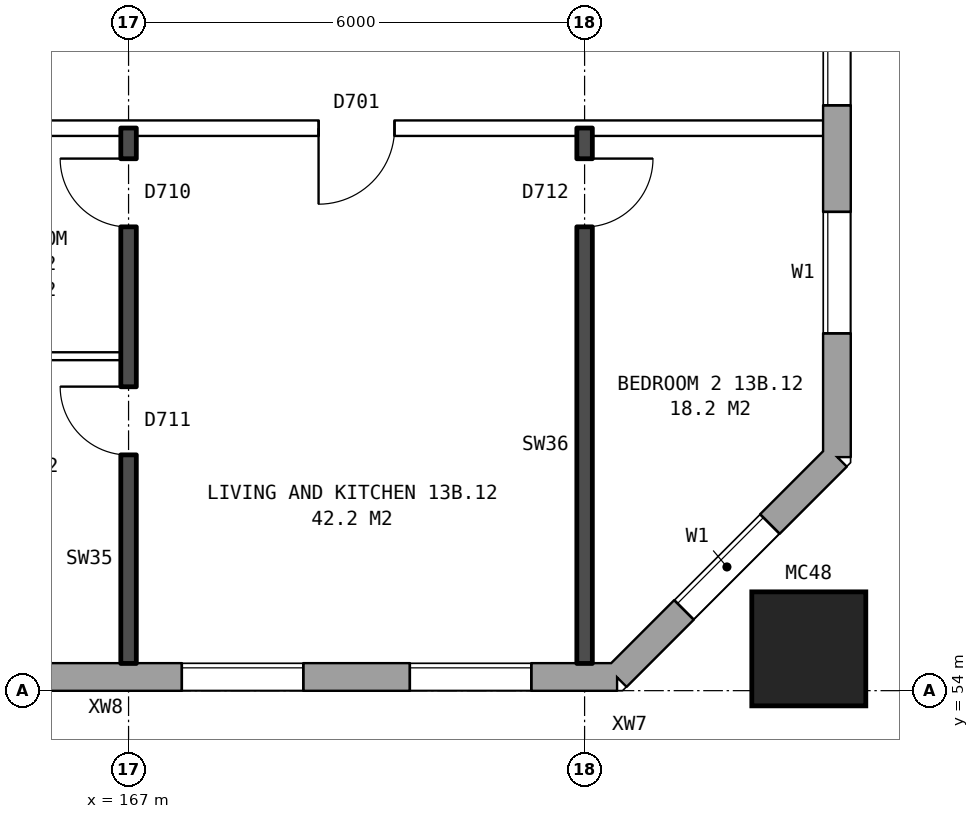
"""IFC4 building model, lengths in metres.
Left out: names, types, materials, properties, quantities, classifications, styles, units other than length and angle.
Written with IfcOpenShell. Run it as: python <this file> out.ifc"""

import sys

from ifc_helpers import new_model, si_unit, direction, frame, frame_2d, origin, origin_2d, place, context, subcontext, project, spatial, rectangle, hollow_rectangle, extrude, element, fill, save


model = new_model("IFC4")
c1 = context("Model", 3, precision=1e-05, world=origin(), true_north=direction((0.0, 1.0)))
c2 = subcontext(c1, "Body", "Model", "MODEL_VIEW")
j1 = project(units=[si_unit("LENGTHUNIT", "METRE"), si_unit("PLANEANGLEUNIT", "RADIAN")], contexts=[c1])
p1 = place(None, origin())
s1 = spatial("IfcSite", under=j1, at=p1, CompositionType="ELEMENT")
p2 = place(p1, origin())
s2 = spatial("IfcBuilding", under=s1, at=p2, CompositionType="ELEMENT")
p3 = place(p2, frame((0.0, 0.0, 50.5)))
s3 = spatial("IfcBuildingStorey", under=s2, at=p3, CompositionType="ELEMENT", Elevation=50.5)
p4 = place(p3, frame((175.95, 54.55, 0.0), z_axis=(0.0, 0.0, 1.0), x_axis=(1.0, 0.0, 0.0)))
e1 = element("IfcColumn", 1, at=p4, inside=s3, PredefinedType="COLUMN", context=c2, shape_type="SweptSolid", body=[
    extrude(hollow_rectangle(XDim=1.5, YDim=1.5, WallThickness=0.08, at=origin_2d()), origin(), (0.0, 0.0, 1.0), 3.1),
])
p5 = place(p3, frame((134.075, 54.18, 0.0), z_axis=(0.0, 0.0, 1.0), x_axis=(1.0, 0.0, 0.0)))
e2 = element("IfcWall", 2, at=p5, inside=s3, PredefinedType="STANDARD", context=c2, shape_type="SweptSolid", body=[
    extrude(rectangle(XDim=39.351, YDim=0.36, at=frame_2d((19.675, 0.0))), origin(), (0.0, 0.0, 1.0), 2.85),
])
p6 = place(p5, frame((0.625, 0.0, 0.8)))
e3 = element("IfcOpeningElement", 3, at=p6, cuts=e2, PredefinedType="OPENING", context=c2, shape_type="SweptSolid", body=[
    extrude(rectangle(XDim=1.6, YDim=1.8, at=frame_2d((0.8, 0.9))), frame((0.0, 0.19, 0.0), z_axis=(0.0, -1.0, 0.0), x_axis=(1.0, 0.0, 0.0)), (0.0, 0.0, 1.0), 0.38),
])
p7 = place(p5, frame((3.625, 0.0, 0.8)))
e4 = element("IfcOpeningElement", 4, at=p7, cuts=e2, PredefinedType="OPENING", context=c2, shape_type="SweptSolid", body=[
    extrude(rectangle(XDim=1.6, YDim=1.8, at=frame_2d((0.8, 0.9))), frame((0.0, 0.19, 0.0), z_axis=(0.0, -1.0, 0.0), x_axis=(1.0, 0.0, 0.0)), (0.0, 0.0, 1.0), 0.38),
])
p8 = place(p5, frame((5.525, 0.0, 1.4)))
e5 = element("IfcOpeningElement", 5, at=p8, cuts=e2, PredefinedType="OPENING", context=c2, shape_type="SweptSolid", body=[
    extrude(rectangle(XDim=0.6, YDim=1.2, at=frame_2d((0.3, 0.6))), frame((0.0, 0.19, 0.0), z_axis=(0.0, -1.0, 0.0), x_axis=(1.0, 0.0, 0.0)), (0.0, 0.0, 1.0), 0.38),
])
p9 = place(p5, frame((9.625, 0.0, 0.8)))
e6 = element("IfcOpeningElement", 6, at=p9, cuts=e2, PredefinedType="OPENING", context=c2, shape_type="SweptSolid", body=[
    extrude(rectangle(XDim=1.6, YDim=1.8, at=frame_2d((0.8, 0.9))), frame((0.0, 0.19, 0.0), z_axis=(0.0, -1.0, 0.0), x_axis=(1.0, 0.0, 0.0)), (0.0, 0.0, 1.0), 0.38),
])
p10 = place(p5, frame((12.625, 0.0, 0.8)))
e7 = element("IfcOpeningElement", 7, at=p10, cuts=e2, PredefinedType="OPENING", context=c2, shape_type="SweptSolid", body=[
    extrude(rectangle(XDim=1.6, YDim=1.8, at=frame_2d((0.8, 0.9))), frame((0.0, 0.19, 0.0), z_axis=(0.0, -1.0, 0.0), x_axis=(1.0, 0.0, 0.0)), (0.0, 0.0, 1.0), 0.38),
])
p11 = place(p5, frame((15.625, 0.0, 0.8)))
e8 = element("IfcOpeningElement", 8, at=p11, cuts=e2, PredefinedType="OPENING", context=c2, shape_type="SweptSolid", body=[
    extrude(rectangle(XDim=1.6, YDim=1.8, at=frame_2d((0.8, 0.9))), frame((0.0, 0.19, 0.0), z_axis=(0.0, -1.0, 0.0), x_axis=(1.0, 0.0, 0.0)), (0.0, 0.0, 1.0), 0.38),
])
p12 = place(p5, frame((18.625, 0.0, 0.8)))
e9 = element("IfcOpeningElement", 9, at=p12, cuts=e2, PredefinedType="OPENING", context=c2, shape_type="SweptSolid", body=[
    extrude(rectangle(XDim=1.6, YDim=1.8, at=frame_2d((0.8, 0.9))), frame((0.0, 0.19, 0.0), z_axis=(0.0, -1.0, 0.0), x_axis=(1.0, 0.0, 0.0)), (0.0, 0.0, 1.0), 0.38),
])
p13 = place(p5, frame((21.625, 0.0, 0.8)))
e10 = element("IfcOpeningElement", 10, at=p13, cuts=e2, PredefinedType="OPENING", context=c2, shape_type="SweptSolid", body=[
    extrude(rectangle(XDim=1.6, YDim=1.8, at=frame_2d((0.8, 0.9))), frame((0.0, 0.19, 0.0), z_axis=(0.0, -1.0, 0.0), x_axis=(1.0, 0.0, 0.0)), (0.0, 0.0, 1.0), 0.38),
])
p14 = place(p5, frame((24.625, 0.0, 0.8)))
e11 = element("IfcOpeningElement", 11, at=p14, cuts=e2, PredefinedType="OPENING", context=c2, shape_type="SweptSolid", body=[
    extrude(rectangle(XDim=1.6, YDim=1.8, at=frame_2d((0.8, 0.9))), frame((0.0, 0.19, 0.0), z_axis=(0.0, -1.0, 0.0), x_axis=(1.0, 0.0, 0.0)), (0.0, 0.0, 1.0), 0.38),
])
p15 = place(p5, frame((27.625, 0.0, 0.8)))
e12 = element("IfcOpeningElement", 12, at=p15, cuts=e2, PredefinedType="OPENING", context=c2, shape_type="SweptSolid", body=[
    extrude(rectangle(XDim=1.6, YDim=1.8, at=frame_2d((0.8, 0.9))), frame((0.0, 0.19, 0.0), z_axis=(0.0, -1.0, 0.0), x_axis=(1.0, 0.0, 0.0)), (0.0, 0.0, 1.0), 0.38),
])
p16 = place(p5, frame((30.125, 0.0, 0.8)))
e13 = element("IfcOpeningElement", 13, at=p16, cuts=e2, PredefinedType="OPENING", context=c2, shape_type="SweptSolid", body=[
    extrude(rectangle(XDim=0.6, YDim=1.5, at=frame_2d((0.3, 0.75))), frame((0.0, 0.19, 0.0), z_axis=(0.0, -1.0, 0.0), x_axis=(1.0, 0.0, 0.0)), (0.0, 0.0, 1.0), 0.38),
])
p17 = place(p5, frame((33.625, 0.0, 0.8)))
e14 = element("IfcOpeningElement", 14, at=p17, cuts=e2, PredefinedType="OPENING", context=c2, shape_type="SweptSolid", body=[
    extrude(rectangle(XDim=1.6, YDim=1.8, at=frame_2d((0.8, 0.9))), frame((0.0, 0.19, 0.0), z_axis=(0.0, -1.0, 0.0), x_axis=(1.0, 0.0, 0.0)), (0.0, 0.0, 1.0), 0.38),
])
p18 = place(p5, frame((36.625, 0.0, 0.8)))
e15 = element("IfcOpeningElement", 15, at=p18, cuts=e2, PredefinedType="OPENING", context=c2, shape_type="SweptSolid", body=[
    extrude(rectangle(XDim=1.6, YDim=1.8, at=frame_2d((0.8, 0.9))), frame((0.0, 0.19, 0.0), z_axis=(0.0, -1.0, 0.0), x_axis=(1.0, 0.0, 0.0)), (0.0, 0.0, 1.0), 0.38),
])
p19 = place(p5, frame((7.725, 0.0, 0.8)))
e16 = element("IfcOpeningElement", 16, at=p19, cuts=e2, PredefinedType="OPENING", context=c2, shape_type="SweptSolid", body=[
    extrude(rectangle(XDim=1.0, YDim=0.9, at=frame_2d((0.5, 0.45))), frame((0.0, 0.19, 0.0), z_axis=(0.0, -1.0, 0.0), x_axis=(1.0, 0.0, 0.0)), (0.0, 0.0, 1.0), 0.38),
])
p20 = place(p5, frame((31.025, 0.0, 0.8)))
e17 = element("IfcOpeningElement", 17, at=p20, cuts=e2, PredefinedType="OPENING", context=c2, shape_type="SweptSolid", body=[
    extrude(rectangle(XDim=0.6, YDim=0.9, at=frame_2d((0.3, 0.45))), frame((0.0, 0.19, 0.0), z_axis=(0.0, -1.0, 0.0), x_axis=(1.0, 0.0, 0.0)), (0.0, 0.0, 1.0), 0.38),
])
p21 = place(p3, frame((173.425, 54.18, 0.0), z_axis=(0.0, 0.0, 1.0), x_axis=(0.707106781187, 0.707106781187, 0.0)))
e18 = element("IfcWall", 18, at=p21, inside=s3, PredefinedType="STANDARD", context=c2, shape_type="SweptSolid", body=[
    extrude(rectangle(XDim=4.094, YDim=0.36, at=frame_2d((2.047, 0.0))), origin(), (0.0, 0.0, 1.0), 2.85),
])
p22 = place(p21, frame((1.247, 0.0, 0.8)))
e19 = element("IfcOpeningElement", 19, at=p22, cuts=e18, PredefinedType="OPENING", context=c2, shape_type="SweptSolid", body=[
    extrude(rectangle(XDim=1.6, YDim=1.8, at=frame_2d((0.8, 0.9))), frame((0.0, 0.19, 0.0), z_axis=(0.0, -1.0, 0.0), x_axis=(1.0, 0.0, 0.0)), (0.0, 0.0, 1.0), 0.38),
])
p23 = place(p3, frame((176.32, 57.075, 0.0), z_axis=(0.0, 0.0, 1.0), x_axis=(0.0, 1.0, 0.0)))
e20 = element("IfcWall", 20, at=p23, inside=s3, PredefinedType="STANDARD", context=c2, shape_type="SweptSolid", body=[
    extrude(rectangle(XDim=25.851, YDim=0.36, at=frame_2d((12.925, 0.0))), origin(), (0.0, 0.0, 1.0), 2.85),
])
p24 = place(p23, frame((1.625, 0.0, 0.8)))
e21 = element("IfcOpeningElement", 21, at=p24, cuts=e20, PredefinedType="OPENING", context=c2, shape_type="SweptSolid", body=[
    extrude(rectangle(XDim=1.6, YDim=1.8, at=frame_2d((0.8, 0.9))), frame((0.0, 0.19, 0.0), z_axis=(0.0, -1.0, 0.0), x_axis=(1.0, 0.0, 0.0)), (0.0, 0.0, 1.0), 0.38),
])
p25 = place(p23, frame((4.625, 0.0, 0.8)))
e22 = element("IfcOpeningElement", 22, at=p25, cuts=e20, PredefinedType="OPENING", context=c2, shape_type="SweptSolid", body=[
    extrude(rectangle(XDim=1.6, YDim=1.8, at=frame_2d((0.8, 0.9))), frame((0.0, 0.19, 0.0), z_axis=(0.0, -1.0, 0.0), x_axis=(1.0, 0.0, 0.0)), (0.0, 0.0, 1.0), 0.38),
])
p26 = place(p23, frame((6.525, 0.0, 0.8)))
e23 = element("IfcOpeningElement", 23, at=p26, cuts=e20, PredefinedType="OPENING", context=c2, shape_type="SweptSolid", body=[
    extrude(rectangle(XDim=1.6, YDim=1.8, at=frame_2d((0.8, 0.9))), frame((0.0, 0.19, 0.0), z_axis=(0.0, -1.0, 0.0), x_axis=(1.0, 0.0, 0.0)), (0.0, 0.0, 1.0), 0.38),
])
p27 = place(p23, frame((8.425, 0.0, 1.1)))
e24 = element("IfcOpeningElement", 24, at=p27, cuts=e20, PredefinedType="OPENING", context=c2, shape_type="SweptSolid", body=[
    extrude(rectangle(XDim=0.8, YDim=1.5, at=frame_2d((0.4, 0.75))), frame((0.0, 0.19, 0.0), z_axis=(0.0, -1.0, 0.0), x_axis=(1.0, 0.0, 0.0)), (0.0, 0.0, 1.0), 0.38),
])
p28 = place(p23, frame((9.525, 0.0, 1.6)))
e25 = element("IfcOpeningElement", 25, at=p28, cuts=e20, PredefinedType="OPENING", context=c2, shape_type="SweptSolid", body=[
    extrude(rectangle(XDim=0.6, YDim=0.9, at=frame_2d((0.3, 0.45))), frame((0.0, 0.19, 0.0), z_axis=(0.0, -1.0, 0.0), x_axis=(1.0, 0.0, 0.0)), (0.0, 0.0, 1.0), 0.38),
])
p29 = place(p23, frame((11.475, 0.0, 0.8)))
e26 = element("IfcOpeningElement", 26, at=p29, cuts=e20, PredefinedType="OPENING", context=c2, shape_type="SweptSolid", body=[
    extrude(rectangle(XDim=0.6, YDim=0.9, at=frame_2d((0.3, 0.45))), frame((0.0, 0.19, 0.0), z_axis=(0.0, -1.0, 0.0), x_axis=(1.0, 0.0, 0.0)), (0.0, 0.0, 1.0), 0.38),
])
p30 = place(p23, frame((19.625, 0.0, 0.8)))
e27 = element("IfcOpeningElement", 27, at=p30, cuts=e20, PredefinedType="OPENING", context=c2, shape_type="SweptSolid", body=[
    extrude(rectangle(XDim=1.6, YDim=1.8, at=frame_2d((0.8, 0.9))), frame((0.0, 0.19, 0.0), z_axis=(0.0, -1.0, 0.0), x_axis=(1.0, 0.0, 0.0)), (0.0, 0.0, 1.0), 0.38),
])
p31 = place(p23, frame((22.625, 0.0, 0.8)))
e28 = element("IfcOpeningElement", 28, at=p31, cuts=e20, PredefinedType="OPENING", context=c2, shape_type="SweptSolid", body=[
    extrude(rectangle(XDim=1.6, YDim=1.8, at=frame_2d((0.8, 0.9))), frame((0.0, 0.19, 0.0), z_axis=(0.0, -1.0, 0.0), x_axis=(1.0, 0.0, 0.0)), (0.0, 0.0, 1.0), 0.38),
])
p32 = place(p23, frame((12.375, 0.0, 0.8)))
e29 = element("IfcOpeningElement", 29, at=p32, cuts=e20, PredefinedType="OPENING", context=c2, shape_type="SweptSolid", body=[
    extrude(rectangle(XDim=1.0, YDim=1.8, at=frame_2d((0.5, 0.9))), frame((0.0, 0.19, 0.0), z_axis=(0.0, -1.0, 0.0), x_axis=(1.0, 0.0, 0.0)), (0.0, 0.0, 1.0), 0.38),
])
p33 = place(p23, frame((13.675, 0.0, 0.8)))
e30 = element("IfcOpeningElement", 30, at=p33, cuts=e20, PredefinedType="OPENING", context=c2, shape_type="SweptSolid", body=[
    extrude(rectangle(XDim=0.6, YDim=0.9, at=frame_2d((0.3, 0.45))), frame((0.0, 0.19, 0.0), z_axis=(0.0, -1.0, 0.0), x_axis=(1.0, 0.0, 0.0)), (0.0, 0.0, 1.0), 0.38),
])
p34 = place(p23, frame((15.575, 0.0, 1.7)))
e31 = element("IfcOpeningElement", 31, at=p34, cuts=e20, PredefinedType="OPENING", context=c2, shape_type="SweptSolid", body=[
    extrude(rectangle(XDim=0.6, YDim=0.9, at=frame_2d((0.3, 0.45))), frame((0.0, 0.19, 0.0), z_axis=(0.0, -1.0, 0.0), x_axis=(1.0, 0.0, 0.0)), (0.0, 0.0, 1.0), 0.38),
])
p35 = place(p23, frame((16.575, 0.0, 1.1)))
e32 = element("IfcOpeningElement", 32, at=p35, cuts=e20, PredefinedType="OPENING", context=c2, shape_type="SweptSolid", body=[
    extrude(rectangle(XDim=0.8, YDim=1.5, at=frame_2d((0.4, 0.75))), frame((0.0, 0.19, 0.0), z_axis=(0.0, -1.0, 0.0), x_axis=(1.0, 0.0, 0.0)), (0.0, 0.0, 1.0), 0.38),
])
p36 = place(p23, frame((17.675, 0.0, 0.8)))
e33 = element("IfcOpeningElement", 33, at=p36, cuts=e20, PredefinedType="OPENING", context=c2, shape_type="SweptSolid", body=[
    extrude(rectangle(XDim=1.6, YDim=1.8, at=frame_2d((0.8, 0.9))), frame((0.0, 0.19, 0.0), z_axis=(0.0, -1.0, 0.0), x_axis=(1.0, 0.0, 0.0)), (0.0, 0.0, 1.0), 0.38),
])
p37 = place(p3, frame((164.1, 58.4, 0.0), z_axis=(0.0, 0.0, 1.0), x_axis=(1.0, 0.0, 0.0)))
e34 = element("IfcWall", 34, at=p37, inside=s3, PredefinedType="PARTITIONING", context=c2, shape_type="SweptSolid", body=[
    extrude(rectangle(XDim=2.8, YDim=0.1, at=frame_2d((1.4, 0.0))), origin(), (0.0, 0.0, 1.0), 2.85),
])
p38 = place(p3, frame((155.1, 61.4, 0.0), z_axis=(0.0, 0.0, 1.0), x_axis=(1.0, 0.0, 0.0)))
e35 = element("IfcWall", 35, at=p38, inside=s3, PredefinedType="PARTITIONING", context=c2, shape_type="SweptSolid", body=[
    extrude(rectangle(XDim=21.04, YDim=0.2, at=frame_2d((10.52, 0.0))), origin(), (0.0, 0.0, 1.0), 2.85),
])
p39 = place(p38, frame((2.45, 0.0, 0.0)))
e36 = element("IfcOpeningElement", 36, at=p39, cuts=e35, PredefinedType="OPENING", context=c2, shape_type="SweptSolid", body=[
    extrude(rectangle(XDim=1.0, YDim=2.1, at=frame_2d((0.5, 1.05))), frame((0.0, 0.11, 0.0), z_axis=(0.0, -1.0, 0.0), x_axis=(1.0, 0.0, 0.0)), (0.0, 0.0, 1.0), 0.22),
])
p40 = place(p38, frame((14.4, 0.0, 0.0)))
e37 = element("IfcOpeningElement", 37, at=p40, cuts=e35, PredefinedType="OPENING", context=c2, shape_type="SweptSolid", body=[
    extrude(rectangle(XDim=1.0, YDim=2.1, at=frame_2d((0.5, 1.05))), frame((0.0, 0.11, 0.0), z_axis=(0.0, -1.0, 0.0), x_axis=(1.0, 0.0, 0.0)), (0.0, 0.0, 1.0), 0.22),
])
p41 = place(p3, frame((167.0, 54.36, 0.0), z_axis=(0.0, 0.0, 1.0), x_axis=(0.0, 1.0, 0.0)))
e38 = element("IfcWall", 38, at=p41, inside=s3, PredefinedType="SOLIDWALL", context=c2, shape_type="SweptSolid", body=[
    extrude(rectangle(XDim=7.04, YDim=0.2, at=frame_2d((3.52, 0.0))), origin(), (0.0, 0.0, 1.0), 2.85),
])
p42 = place(p41, frame((2.74, 0.0, 0.0)))
e39 = element("IfcOpeningElement", 39, at=p42, cuts=e38, PredefinedType="OPENING", context=c2, shape_type="SweptSolid", body=[
    extrude(rectangle(XDim=0.9, YDim=2.1, at=frame_2d((0.45, 1.05))), frame((0.0, 0.11, 0.0), z_axis=(0.0, -1.0, 0.0), x_axis=(1.0, 0.0, 0.0)), (0.0, 0.0, 1.0), 0.22),
])
p43 = place(p41, frame((5.74, 0.0, 0.0)))
e40 = element("IfcOpeningElement", 40, at=p43, cuts=e38, PredefinedType="OPENING", context=c2, shape_type="SweptSolid", body=[
    extrude(rectangle(XDim=0.9, YDim=2.1, at=frame_2d((0.45, 1.05))), frame((0.0, 0.11, 0.0), z_axis=(0.0, -1.0, 0.0), x_axis=(1.0, 0.0, 0.0)), (0.0, 0.0, 1.0), 0.22),
])
p44 = place(p3, frame((173.0, 54.36, 0.0), z_axis=(0.0, 0.0, 1.0), x_axis=(0.0, 1.0, 0.0)))
e41 = element("IfcWall", 41, at=p44, inside=s3, PredefinedType="SOLIDWALL", context=c2, shape_type="SweptSolid", body=[
    extrude(rectangle(XDim=7.04, YDim=0.2, at=frame_2d((3.52, 0.0))), origin(), (0.0, 0.0, 1.0), 2.85),
])
p45 = place(p44, frame((5.74, 0.0, 0.0)))
e42 = element("IfcOpeningElement", 42, at=p45, cuts=e41, PredefinedType="OPENING", context=c2, shape_type="SweptSolid", body=[
    extrude(rectangle(XDim=0.9, YDim=2.1, at=frame_2d((0.45, 1.05))), frame((0.0, 0.11, 0.0), z_axis=(0.0, -1.0, 0.0), x_axis=(1.0, 0.0, 0.0)), (0.0, 0.0, 1.0), 0.22),
])
p46 = place(p17, origin())
e43 = element("IfcWindow", 43, at=p46, inside=s3, PartitioningType="SINGLE_PANEL", PredefinedType="WINDOW", context=c2, shape_type="SweptSolid", body=[
    extrude(rectangle(XDim=1.6, YDim=1.8, at=frame_2d((0.8, 0.9))), frame((0.0, 0.15, 0.0), z_axis=(0.0, -1.0, 0.0), x_axis=(1.0, 0.0, 0.0)), (0.0, 0.0, 1.0), 0.06),
])
fill(e14, e43)
p47 = place(p18, origin())
e44 = element("IfcWindow", 44, at=p47, inside=s3, PartitioningType="SINGLE_PANEL", PredefinedType="WINDOW", context=c2, shape_type="SweptSolid", body=[
    extrude(rectangle(XDim=1.6, YDim=1.8, at=frame_2d((0.8, 0.9))), frame((0.0, 0.15, 0.0), z_axis=(0.0, -1.0, 0.0), x_axis=(1.0, 0.0, 0.0)), (0.0, 0.0, 1.0), 0.06),
])
fill(e15, e44)
p48 = place(p22, origin())
e45 = element("IfcWindow", 45, at=p48, inside=s3, PartitioningType="SINGLE_PANEL", PredefinedType="WINDOW", context=c2, shape_type="SweptSolid", body=[
    extrude(rectangle(XDim=1.6, YDim=1.8, at=frame_2d((0.8, 0.9))), frame((0.0, 0.15, 0.0), z_axis=(0.0, -1.0, 0.0), x_axis=(1.0, 0.0, 0.0)), (0.0, 0.0, 1.0), 0.06),
])
fill(e19, e45)
p49 = place(p24, origin())
e46 = element("IfcWindow", 46, at=p49, inside=s3, PartitioningType="SINGLE_PANEL", PredefinedType="WINDOW", context=c2, shape_type="SweptSolid", body=[
    extrude(rectangle(XDim=1.6, YDim=1.8, at=frame_2d((0.8, 0.9))), frame((0.0, 0.15, 0.0), z_axis=(0.0, -1.0, 0.0), x_axis=(1.0, 0.0, 0.0)), (0.0, 0.0, 1.0), 0.06),
])
fill(e21, e46)
p50 = place(p25, origin())
e47 = element("IfcWindow", 47, at=p50, inside=s3, PartitioningType="SINGLE_PANEL", PredefinedType="WINDOW", context=c2, shape_type="SweptSolid", body=[
    extrude(rectangle(XDim=1.6, YDim=1.8, at=frame_2d((0.8, 0.9))), frame((0.0, 0.15, 0.0), z_axis=(0.0, -1.0, 0.0), x_axis=(1.0, 0.0, 0.0)), (0.0, 0.0, 1.0), 0.06),
])
fill(e22, e47)
p51 = place(p42, origin())
e48 = element("IfcDoor", 48, at=p51, inside=s3, OperationType="SINGLE_SWING_RIGHT", PredefinedType="DOOR", context=c2, shape_type="SweptSolid", body=[
    extrude(rectangle(XDim=0.9, YDim=2.1, at=frame_2d((0.45, 1.05))), frame((0.0, 0.025, 0.0), z_axis=(0.0, -1.0, 0.0), x_axis=(1.0, 0.0, 0.0)), (0.0, 0.0, 1.0), 0.05),
])
fill(e39, e48)
p52 = place(p45, frame((0.9, 0.0, 0.0), z_axis=(0.0, 0.0, 1.0), x_axis=(-1.0, 0.0, 0.0)))
e49 = element("IfcDoor", 49, at=p52, inside=s3, OperationType="SINGLE_SWING_LEFT", PredefinedType="DOOR", context=c2, shape_type="SweptSolid", body=[
    extrude(rectangle(XDim=0.9, YDim=2.1, at=frame_2d((0.45, 1.05))), frame((0.0, 0.025, 0.0), z_axis=(0.0, -1.0, 0.0), x_axis=(1.0, 0.0, 0.0)), (0.0, 0.0, 1.0), 0.05),
])
fill(e42, e49)
p53 = place(p40, frame((1.0, 0.0, 0.0), z_axis=(0.0, 0.0, 1.0), x_axis=(-1.0, 0.0, 0.0)))
e50 = element("IfcDoor", 50, at=p53, inside=s3, OperationType="SINGLE_SWING_RIGHT", PredefinedType="DOOR", context=c2, shape_type="SweptSolid", body=[
    extrude(rectangle(XDim=1.0, YDim=2.1, at=frame_2d((0.5, 1.05))), frame((0.0, 0.025, 0.0), z_axis=(0.0, -1.0, 0.0), x_axis=(1.0, 0.0, 0.0)), (0.0, 0.0, 1.0), 0.05),
])
fill(e37, e50)
p54 = place(p43, origin())
e51 = element("IfcDoor", 51, at=p54, inside=s3, OperationType="SINGLE_SWING_RIGHT", PredefinedType="DOOR", context=c2, shape_type="SweptSolid", body=[
    extrude(rectangle(XDim=0.9, YDim=2.1, at=frame_2d((0.45, 1.05))), frame((0.0, 0.025, 0.0), z_axis=(0.0, -1.0, 0.0), x_axis=(1.0, 0.0, 0.0)), (0.0, 0.0, 1.0), 0.05),
])
fill(e40, e51)
save(model, sys.argv[1])
